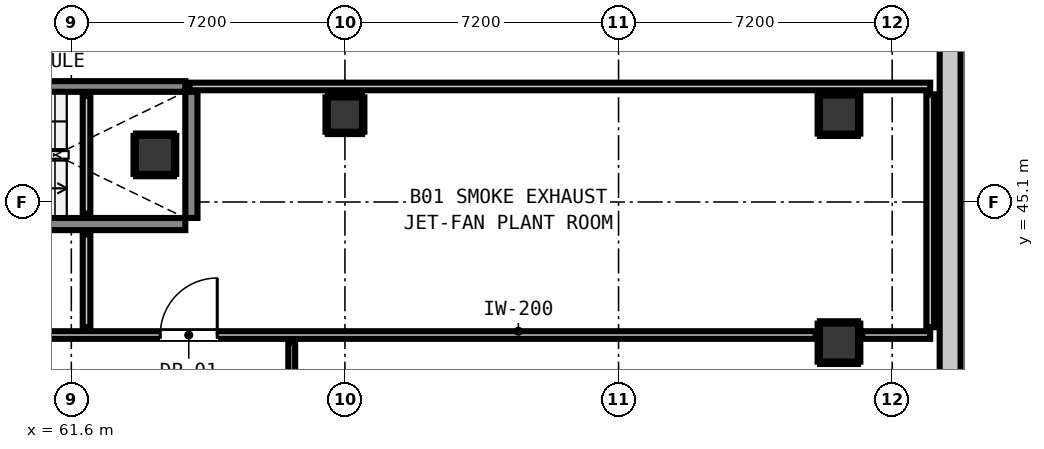
"""IFC4 building model, lengths in metres.
Left out: names, types, materials, properties, quantities, classifications, styles, units other than length and angle.
Written with IfcOpenShell. Run it as: python <this file> out.ifc"""

import sys

from ifc_helpers import new_model, si_unit, direction, frame, frame_2d, origin, origin_2d, place, context, subcontext, project, spatial, rectangle, circle, extrude, element, fill, save


model = new_model("IFC4")
c1 = context("Model", 3, precision=1e-05, world=origin(), true_north=direction((0.0, 1.0)))
c2 = subcontext(c1, "Body", "Model", "MODEL_VIEW")
j1 = project(units=[si_unit("LENGTHUNIT", "METRE"), si_unit("PLANEANGLEUNIT", "RADIAN")], contexts=[c1])
p1 = place(None, origin())
s1 = spatial("IfcSite", under=j1, at=p1, CompositionType="ELEMENT")
p2 = place(p1, origin())
s2 = spatial("IfcBuilding", under=s1, at=p2, CompositionType="ELEMENT")
p3 = place(p2, frame((0.0, 0.0, -4.4)))
s3 = spatial("IfcBuildingStorey", under=s2, at=p3, CompositionType="ELEMENT", Elevation=-4.4)
p4 = place(p3, frame((84.725, 2.55, 0.0), z_axis=(0.0, 0.0, 1.0), x_axis=(0.0, 1.0, 0.0)))
e1 = element("IfcWall", 1, at=p4, inside=s3, PredefinedType="SOLIDWALL", context=c2, shape_type="SweptSolid", body=[
    extrude(rectangle(XDim=55.5, YDim=0.55, at=frame_2d((27.75, 0.0))), origin(), (0.0, 0.0, 1.0), 4.4),
])
p5 = place(p3, frame((64.76, 44.68, 0.0), z_axis=(0.0, 0.0, 1.0), x_axis=(0.0, 1.0, 0.0)))
e2 = element("IfcWall", 2, at=p5, inside=s3, PredefinedType="SHEAR", context=c2, shape_type="SweptSolid", body=[
    extrude(rectangle(XDim=3.32, YDim=0.32, at=frame_2d((1.66, 0.0))), origin(), (0.0, 0.0, 1.0), 4.4),
])
p6 = place(p3, frame((56.2, 48.14, 0.0), z_axis=(0.0, 0.0, 1.0), x_axis=(1.0, 0.0, 0.0)))
e3 = element("IfcWall", 3, at=p6, inside=s3, PredefinedType="SHEAR", context=c2, shape_type="SweptSolid", body=[
    extrude(rectangle(XDim=8.4, YDim=0.28, at=frame_2d((4.2, 0.0))), origin(), (0.0, 0.0, 1.0), 4.4),
])
p7 = place(p3, frame((56.2, 44.52, 0.0), z_axis=(0.0, 0.0, 1.0), x_axis=(1.0, 0.0, 0.0)))
e4 = element("IfcWall", 4, at=p7, inside=s3, PredefinedType="SHEAR", context=c2, shape_type="SweptSolid", body=[
    extrude(rectangle(XDim=8.4, YDim=0.32, at=frame_2d((4.2, 0.0))), origin(), (0.0, 0.0, 1.0), 4.4),
])
p8 = place(p7, frame((0.23, 0.0, 0.0)))
e5 = element("IfcOpeningElement", 5, at=p8, cuts=e4, PredefinedType="OPENING", context=c2, shape_type="SweptSolid", body=[
    extrude(rectangle(XDim=1.1, YDim=2.15, at=frame_2d((0.55, 1.075))), frame((0.0, 0.17, 0.0), z_axis=(0.0, -1.0, 0.0), x_axis=(1.0, 0.0, 0.0)), (0.0, 0.0, 1.0), 0.34),
])
p9 = place(p3, frame((63.8, 46.34, 0.0), z_axis=(0.0, 0.0, 1.0), x_axis=(1.0, 0.0, 0.0)))
e6 = element("IfcColumn", 6, at=p9, inside=s3, PredefinedType="COLUMN", context=c2, shape_type="SweptSolid", body=[
    extrude(rectangle(XDim=1.0, YDim=1.0, at=origin_2d()), origin(), (0.0, 0.0, 1.0), 4.16),
])
for number, where, z_axis, x_axis in (
    (7, (81.8, 41.4, 0.0), (0.0, 0.0, 1.0), (1.0, 0.0, 0.0)),
    (8, (81.8, 47.4, 0.0), (0.0, 0.0, 1.0), (1.0, 0.0, 0.0)),
):
    element("IfcColumn", number, at=place(p3, frame(where, z_axis=z_axis, x_axis=x_axis)), inside=s3, PredefinedType="COLUMN", context=c2, shape_type="SweptSolid", body=[
        extrude(rectangle(XDim=1.0, YDim=1.0, at=origin_2d()), origin(), (0.0, 0.0, 1.0), 4.4),
    ])
p10 = place(p3, frame((68.8, 47.4, 0.0), z_axis=(0.0, 0.0, 1.0), x_axis=(1.0, 0.0, 0.0)))
e9 = element("IfcColumn", 9, at=p10, inside=s3, PredefinedType="COLUMN", context=c2, shape_type="SweptSolid", body=[
    extrude(circle(Radius=0.45, at=origin_2d()), origin(), (0.0, 0.0, 1.0), 4.4),
])
p11 = place(p3, frame((56.412, 41.6, 0.0), z_axis=(0.0, 0.0, 1.0), x_axis=(1.0, 0.0, 0.0)))
e10 = element("IfcWall", 10, at=p11, inside=s3, PredefinedType="PARTITIONING", context=c2, shape_type="SweptSolid", body=[
    extrude(rectangle(XDim=24.776, YDim=0.2, at=frame_2d((12.388, 0.0))), origin(), (0.0, 0.0, 1.0), 3.153),
])
p12 = place(p11, frame((1.288, 0.0, 0.0)))
e11 = element("IfcOpeningElement", 11, at=p12, cuts=e10, PredefinedType="OPENING", context=c2, shape_type="SweptSolid", body=[
    extrude(rectangle(XDim=1.4, YDim=2.15, at=frame_2d((0.7, 1.075))), frame((0.0, 0.11, 0.0), z_axis=(0.0, -1.0, 0.0), x_axis=(1.0, 0.0, 0.0)), (0.0, 0.0, 1.0), 0.22),
])
p13 = place(p11, frame((7.528, 0.0, 0.0)))
e12 = element("IfcOpeningElement", 12, at=p13, cuts=e10, PredefinedType="OPENING", context=c2, shape_type="SweptSolid", body=[
    extrude(rectangle(XDim=1.5, YDim=2.15, at=frame_2d((0.75, 1.075))), frame((0.0, 0.11, 0.0), z_axis=(0.0, -1.0, 0.0), x_axis=(1.0, 0.0, 0.0)), (0.0, 0.0, 1.0), 0.22),
])
p14 = place(p3, frame((82.412, 41.6, 0.0), z_axis=(0.0, 0.0, 1.0), x_axis=(1.0, 0.0, 0.0)))
e13 = element("IfcWall", 13, at=p14, inside=s3, PredefinedType="PARTITIONING", context=c2, shape_type="SweptSolid", body=[
    extrude(rectangle(XDim=1.788, YDim=0.2, at=frame_2d((0.894, 0.0))), origin(), (0.0, 0.0, 1.0), 3.98),
])
p15 = place(p3, frame((64.71, 48.14, 0.0), z_axis=(0.0, 0.0, 1.0), x_axis=(1.0, 0.0, 0.0)))
e14 = element("IfcWall", 14, at=p15, inside=s3, PredefinedType="PARTITIONING", context=c2, shape_type="SweptSolid", body=[
    extrude(rectangle(XDim=19.49, YDim=0.2, at=frame_2d((9.745, 0.0))), origin(), (0.0, 0.0, 1.0), 3.98),
])
p16 = place(p3, frame((62.0, 41.808, 0.0), z_axis=(0.0, 0.0, 1.0), x_axis=(0.0, 1.0, 0.0)))
e15 = element("IfcWall", 15, at=p16, inside=s3, PredefinedType="PARTITIONING", context=c2, shape_type="SweptSolid", body=[
    extrude(rectangle(XDim=2.442, YDim=0.2, at=frame_2d((1.221, 0.0))), origin(), (0.0, 0.0, 1.0), 3.98),
])
p17 = place(p3, frame((62.0, 44.79, 0.0), z_axis=(0.0, 0.0, 1.0), x_axis=(0.0, 1.0, 0.0)))
e16 = element("IfcWall", 16, at=p17, inside=s3, PredefinedType="PARTITIONING", context=c2, shape_type="SweptSolid", body=[
    extrude(rectangle(XDim=3.1, YDim=0.2, at=frame_2d((1.55, 0.0))), origin(), (0.0, 0.0, 1.0), 3.98),
])
p18 = place(p3, frame((84.2, 41.808, 0.0), z_axis=(0.0, 0.0, 1.0), x_axis=(0.0, 1.0, 0.0)))
e17 = element("IfcWall", 17, at=p18, inside=s3, PredefinedType="PARTITIONING", context=c2, shape_type="SweptSolid", body=[
    extrude(rectangle(XDim=6.124, YDim=0.2, at=frame_2d((3.062, 0.0))), origin(), (0.0, 0.0, 1.0), 3.98),
])
p19 = place(p3, frame((67.4, 39.988, 0.0), z_axis=(0.0, 0.0, 1.0), x_axis=(0.0, 1.0, 0.0)))
e18 = element("IfcWall", 18, at=p19, inside=s3, PredefinedType="PARTITIONING", context=c2, shape_type="SweptSolid", body=[
    extrude(rectangle(XDim=1.414, YDim=0.18, at=frame_2d((0.707, 0.0))), origin(), (0.0, 0.0, 1.0), 3.98),
])
for number, where, z_axis, x_axis in (
    (19, (63.3, 45.808, 0.0), (0.0, 0.0, 1.0), (1.0, 0.0, 0.0)),
    (20, (63.3, 46.872, 0.0), (0.0, 0.0, 1.0), (1.0, 0.0, 0.0)),
    (21, (63.268, 45.84, 0.0), (0.0, 0.0, 1.0), (0.0, 1.0, 0.0)),
    (22, (64.332, 45.84, 0.0), (0.0, 0.0, 1.0), (0.0, 1.0, 0.0)),
    (23, (81.3, 40.868, 0.0), (0.0, 0.0, 1.0), (1.0, 0.0, 0.0)),
    (24, (81.3, 41.932, 0.0), (0.0, 0.0, 1.0), (1.0, 0.0, 0.0)),
    (25, (81.268, 40.9, 0.0), (0.0, 0.0, 1.0), (0.0, 1.0, 0.0)),
    (26, (82.332, 40.9, 0.0), (0.0, 0.0, 1.0), (0.0, 1.0, 0.0)),
    (27, (81.3, 46.868, 0.0), (0.0, 0.0, 1.0), (1.0, 0.0, 0.0)),
    (28, (81.3, 47.932, 0.0), (0.0, 0.0, 1.0), (1.0, 0.0, 0.0)),
    (29, (81.268, 46.9, 0.0), (0.0, 0.0, 1.0), (0.0, 1.0, 0.0)),
    (30, (82.332, 46.9, 0.0), (0.0, 0.0, 1.0), (0.0, 1.0, 0.0)),
):
    element("IfcWall", number, at=place(p3, frame(where, z_axis=z_axis, x_axis=x_axis)), inside=s3, PredefinedType="PARTITIONING", context=c2, shape_type="SweptSolid", body=[
        extrude(rectangle(XDim=1.0, YDim=0.06, at=frame_2d((0.5, 0.0))), origin(), (0.0, 0.0, 1.0), 1.45),
    ])
for number, where, z_axis, x_axis in (
    (31, (68.35, 46.918, 0.0), (0.0, 0.0, 1.0), (1.0, 0.0, 0.0)),
    (32, (68.35, 47.882, 0.0), (0.0, 0.0, 1.0), (1.0, 0.0, 0.0)),
):
    element("IfcWall", number, at=place(p3, frame(where, z_axis=z_axis, x_axis=x_axis)), inside=s3, PredefinedType="PARTITIONING", context=c2, shape_type="SweptSolid", body=[
        extrude(rectangle(XDim=0.9, YDim=0.06, at=frame_2d((0.45, 0.0))), origin(), (0.0, 0.0, 1.0), 1.45),
    ])
for number, where, z_axis, x_axis in (
    (33, (68.318, 46.95, 0.0), (0.0, 0.0, 1.0), (0.0, 1.0, 0.0)),
    (34, (69.282, 46.95, 0.0), (0.0, 0.0, 1.0), (0.0, 1.0, 0.0)),
):
    element("IfcWall", number, at=place(p3, frame(where, z_axis=z_axis, x_axis=x_axis)), inside=s3, PredefinedType="PARTITIONING", context=c2, shape_type="SweptSolid", body=[
        extrude(rectangle(XDim=0.9, YDim=0.06, at=frame_2d((0.45, 0.0))), origin(), (0.0, 0.0, 1.0), 1.45),
    ])
p20 = place(p13, origin())
e35 = element("IfcDoor", 35, at=p20, inside=s3, OperationType="SINGLE_SWING_RIGHT", PredefinedType="DOOR", context=c2, shape_type="SweptSolid", body=[
    extrude(rectangle(XDim=1.5, YDim=2.15, at=frame_2d((0.75, 1.075))), frame((0.0, 0.025, 0.0), z_axis=(0.0, -1.0, 0.0), x_axis=(1.0, 0.0, 0.0)), (0.0, 0.0, 1.0), 0.05),
])
fill(e12, e35)
save(model, sys.argv[1])
